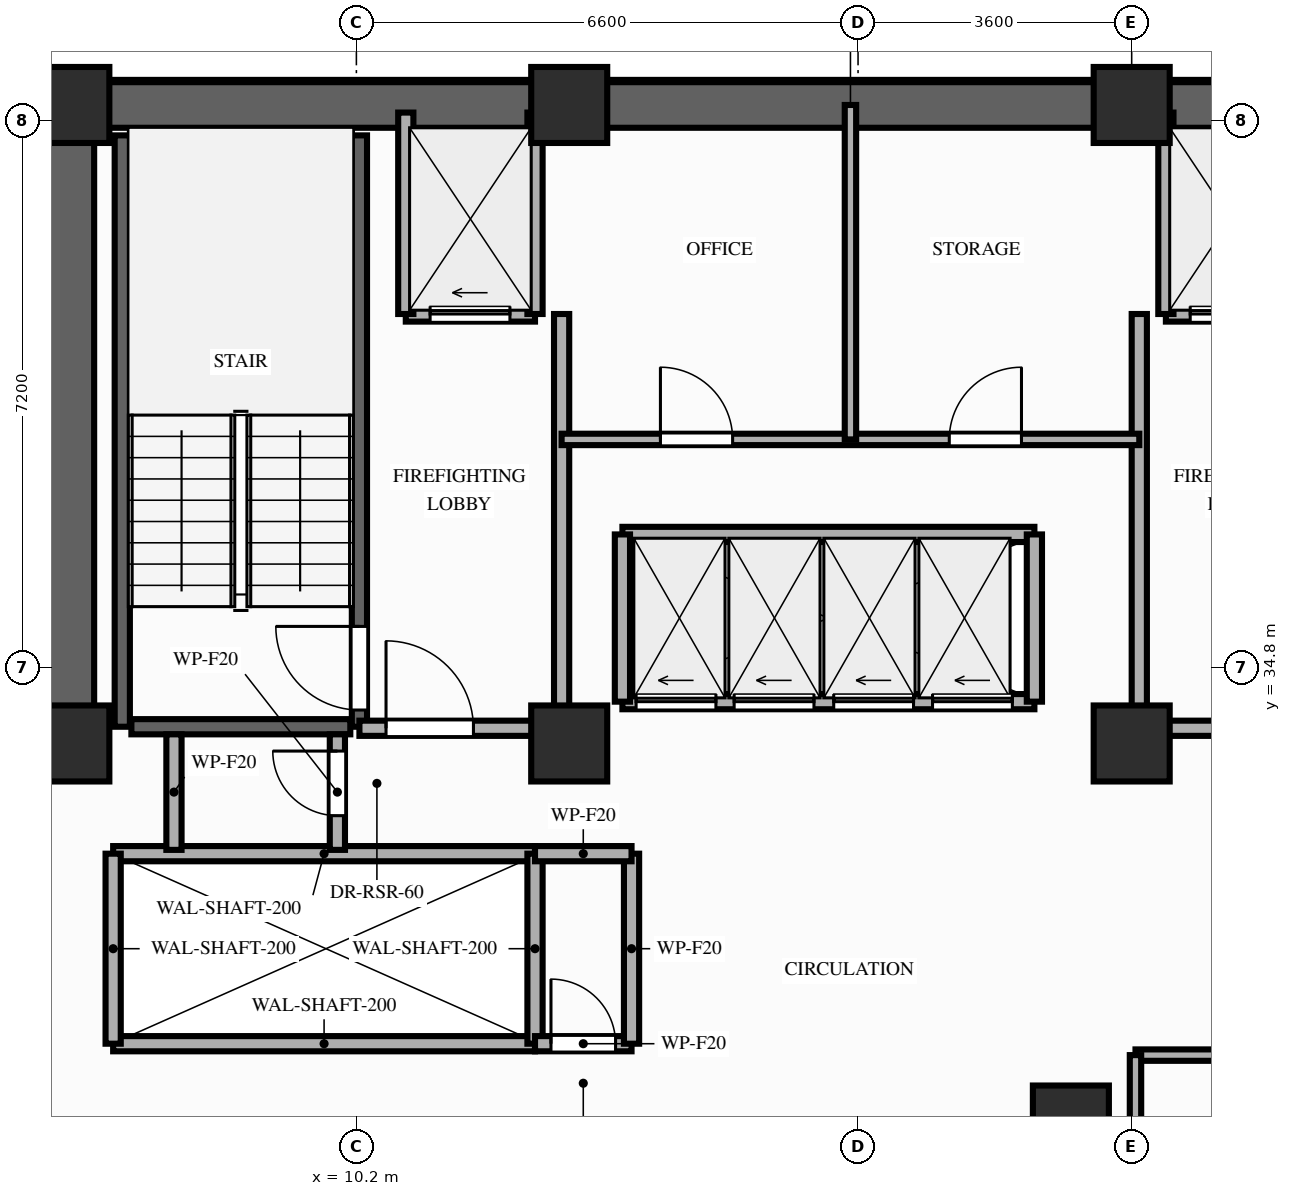
"""IFC4 building model, lengths in metres.
Left out: names, types, materials, properties, quantities, classifications, styles, units other than length and angle.
Written with IfcOpenShell. Run it as: python <this file> out.ifc"""

import sys

from ifc_helpers import new_model, si_unit, direction, frame, frame_2d, origin, origin_2d, place, context, subcontext, project, spatial, rectangle, extrude, element, fill, save


model = new_model("IFC4")
c1 = context("Model", 3, precision=1e-05, world=origin(), true_north=direction((0.0, 1.0)))
c2 = subcontext(c1, "Body", "Model", "MODEL_VIEW")
j1 = project(units=[si_unit("LENGTHUNIT", "METRE"), si_unit("PLANEANGLEUNIT", "RADIAN")], contexts=[c1])
p1 = place(None, origin())
s1 = spatial("IfcSite", under=j1, at=p1, CompositionType="ELEMENT")
p2 = place(p1, origin())
s2 = spatial("IfcBuilding", under=s1, at=p2, CompositionType="ELEMENT")
p3 = place(p2, frame((0.0, 0.0, 139.4)))
s3 = spatial("IfcBuildingStorey", under=s2, at=p3, CompositionType="ELEMENT", Elevation=139.4)
for number, where, z_axis, x_axis in (
    (1, (6.45, 33.8, 0.0), (0.0, 0.0, 1.0), (1.0, 0.0, 0.0)),
    (2, (13.0, 33.8, 0.0), (0.0, 0.0, 1.0), (1.0, 0.0, 0.0)),
    (3, (20.4, 33.8, 0.0), (0.0, 0.0, 1.0), (1.0, 0.0, 0.0)),
    (4, (6.45, 42.2, 0.0), (0.0, 0.0, 1.0), (1.0, 0.0, 0.0)),
    (5, (13.0, 42.2, 0.0), (0.0, 0.0, 1.0), (1.0, 0.0, 0.0)),
    (6, (20.4, 42.2, 0.0), (0.0, 0.0, 1.0), (1.0, 0.0, 0.0)),
    (7, (19.6, 28.8, 0.0), (0.0, 0.0, 1.0), (1.0, 0.0, 0.0)),
):
    element("IfcColumn", number, at=place(p3, frame(where, z_axis=z_axis, x_axis=x_axis)), inside=s3, PredefinedType="COLUMN", context=c2, shape_type="SweptSolid", body=[
        extrude(rectangle(XDim=1.0, YDim=1.0, at=origin_2d()), origin(), (0.0, 0.0, 1.0), 3.2),
    ])
p4 = place(p3, frame((6.45, 42.2, 0.0), z_axis=(0.0, 0.0, 1.0), x_axis=(1.0, 0.0, 0.0)))
e8 = element("IfcWall", 8, at=p4, inside=s3, PredefinedType="SHEAR", context=c2, shape_type="SweptSolid", body=[
    extrude(rectangle(XDim=20.45, YDim=0.6, at=frame_2d((10.225, 0.0))), origin(), (0.0, 0.0, 1.0), 3.02),
])
p5 = place(p3, frame((6.45, 33.8, 0.0), z_axis=(0.0, 0.0, 1.0), x_axis=(0.0, 1.0, 0.0)))
e9 = element("IfcWall", 9, at=p5, inside=s3, PredefinedType="SHEAR", context=c2, shape_type="SweptSolid", body=[
    extrude(rectangle(XDim=7.95, YDim=0.6, at=frame_2d((3.975, 0.0))), origin(), (0.0, 0.0, 1.0), 3.02),
])
p6 = place(p3, frame((7.12, 34.02, 0.0), z_axis=(0.0, 0.0, 1.0), x_axis=(0.0, 1.0, 0.0)))
e10 = element("IfcWall", 10, at=p6, inside=s3, PredefinedType="SHEAR", context=c2, shape_type="SweptSolid", body=[
    extrude(rectangle(XDim=7.78, YDim=0.2, at=frame_2d((3.89, 0.0))), origin(), (0.0, 0.0, 1.0), 3.02),
])
p7 = place(p3, frame((10.24, 34.02, 0.0), z_axis=(0.0, 0.0, 1.0), x_axis=(0.0, 1.0, 0.0)))
e11 = element("IfcWall", 11, at=p7, inside=s3, PredefinedType="SHEAR", context=c2, shape_type="SweptSolid", body=[
    extrude(rectangle(XDim=7.78, YDim=0.2, at=frame_2d((3.89, 0.0))), origin(), (0.0, 0.0, 1.0), 3.02),
])
p8 = place(p7, frame((0.22, 0.0, 0.0)))
e12 = element("IfcOpeningElement", 12, at=p8, cuts=e11, PredefinedType="OPENING", context=c2, shape_type="SweptSolid", body=[
    extrude(rectangle(XDim=1.1, YDim=2.15, at=frame_2d((0.55, 1.075))), frame((0.0, 0.11, 0.0), z_axis=(0.0, -1.0, 0.0), x_axis=(1.0, 0.0, 0.0)), (0.0, 0.0, 1.0), 0.22),
])
p9 = place(p3, frame((7.24, 34.02, 0.0), z_axis=(0.0, 0.0, 1.0), x_axis=(1.0, 0.0, 0.0)))
e13 = element("IfcWall", 13, at=p9, inside=s3, PredefinedType="SHEAR", context=c2, shape_type="SweptSolid", body=[
    extrude(rectangle(XDim=2.88, YDim=0.2, at=frame_2d((1.44, 0.0))), origin(), (0.0, 0.0, 1.0), 3.02),
])
for number, where, z_axis, x_axis in (
    (14, (7.0, 29.85, 0.0), (0.0, 0.0, 1.0), (1.0, 0.0, 0.0)),
    (15, (7.0, 32.35, 0.0), (0.0, 0.0, 1.0), (1.0, 0.0, 0.0)),
):
    element("IfcWall", number, at=place(p3, frame(where, z_axis=z_axis, x_axis=x_axis)), inside=s3, PredefinedType="MOVABLE", context=c2, shape_type="SweptSolid", body=[
        extrude(rectangle(XDim=5.55, YDim=0.2, at=frame_2d((2.775, 0.0))), origin(), (0.0, 0.0, 1.0), 3.02),
    ])
for number, where, z_axis, x_axis in (
    (16, (7.0, 29.85, 0.0), (0.0, 0.0, 1.0), (0.0, 1.0, 0.0)),
    (17, (12.55, 29.85, 0.0), (0.0, 0.0, 1.0), (0.0, 1.0, 0.0)),
):
    element("IfcWall", number, at=place(p3, frame(where, z_axis=z_axis, x_axis=x_axis)), inside=s3, PredefinedType="MOVABLE", context=c2, shape_type="SweptSolid", body=[
        extrude(rectangle(XDim=2.5, YDim=0.2, at=frame_2d((1.25, 0.0))), origin(), (0.0, 0.0, 1.0), 3.02),
    ])
p10 = place(p3, frame((10.85, 39.45, 0.0), z_axis=(0.0, 0.0, 1.0), x_axis=(1.0, 0.0, 0.0)))
e18 = element("IfcWall", 18, at=p10, inside=s3, PredefinedType="MOVABLE", context=c2, shape_type="SweptSolid", body=[
    extrude(rectangle(XDim=1.7, YDim=0.2, at=frame_2d((0.85, 0.0))), origin(), (0.0, 0.0, 1.0), 3.02),
])
p11 = place(p10, frame((0.32, 0.0, 0.0)))
e19 = element("IfcOpeningElement", 19, at=p11, cuts=e18, PredefinedType="OPENING", context=c2, shape_type="SweptSolid", body=[
    extrude(rectangle(XDim=1.05, YDim=2.15, at=frame_2d((0.525, 1.075))), frame((0.0, 0.11, 0.0), z_axis=(0.0, -1.0, 0.0), x_axis=(1.0, 0.0, 0.0)), (0.0, 0.0, 1.0), 0.22),
])
p12 = place(p3, frame((20.85, 39.45, 0.0), z_axis=(0.0, 0.0, 1.0), x_axis=(1.0, 0.0, 0.0)))
e20 = element("IfcWall", 20, at=p12, inside=s3, PredefinedType="MOVABLE", context=c2, shape_type="SweptSolid", body=[
    extrude(rectangle(XDim=1.7, YDim=0.2, at=frame_2d((0.85, 0.0))), origin(), (0.0, 0.0, 1.0), 3.02),
])
p13 = place(p12, frame((0.32, 0.0, 0.0)))
e21 = element("IfcOpeningElement", 21, at=p13, cuts=e20, PredefinedType="OPENING", context=c2, shape_type="SweptSolid", body=[
    extrude(rectangle(XDim=1.05, YDim=2.15, at=frame_2d((0.525, 1.075))), frame((0.0, 0.11, 0.0), z_axis=(0.0, -1.0, 0.0), x_axis=(1.0, 0.0, 0.0)), (0.0, 0.0, 1.0), 0.22),
])
for number, where, z_axis, x_axis in (
    (22, (10.85, 39.45, 0.0), (0.0, 0.0, 1.0), (0.0, 1.0, 0.0)),
    (23, (12.55, 39.45, 0.0), (0.0, 0.0, 1.0), (0.0, 1.0, 0.0)),
):
    element("IfcWall", number, at=place(p3, frame(where, z_axis=z_axis, x_axis=x_axis)), inside=s3, PredefinedType="MOVABLE", context=c2, shape_type="SweptSolid", body=[
        extrude(rectangle(XDim=2.65, YDim=0.2, at=frame_2d((1.325, 0.0))), origin(), (0.0, 0.0, 1.0), 2.45),
    ])
p14 = place(p3, frame((12.9, 34.0, 0.0), z_axis=(0.0, 0.0, 1.0), x_axis=(0.0, 1.0, 0.0)))
e24 = element("IfcWall", 24, at=p14, inside=s3, PredefinedType="PARTITIONING", context=c2, shape_type="SweptSolid", body=[
    extrude(rectangle(XDim=5.45, YDim=0.2, at=frame_2d((2.725, 0.0))), origin(), (0.0, 0.0, 1.0), 2.45),
])
p15 = place(p3, frame((10.24, 34.0, 0.0), z_axis=(0.0, 0.0, 1.0), x_axis=(1.0, 0.0, 0.0)))
e25 = element("IfcWall", 25, at=p15, inside=s3, PredefinedType="PARTITIONING", context=c2, shape_type="SweptSolid", body=[
    extrude(rectangle(XDim=2.66, YDim=0.2, at=frame_2d((1.33, 0.0))), origin(), (0.0, 0.0, 1.0), 2.45),
])
p16 = place(p15, frame((0.35, 0.0, 0.0)))
e26 = element("IfcOpeningElement", 26, at=p16, cuts=e25, PredefinedType="OPENING", context=c2, shape_type="SweptSolid", body=[
    extrude(rectangle(XDim=1.15, YDim=2.15, at=frame_2d((0.575, 1.075))), frame((0.0, 0.11, 0.0), z_axis=(0.0, -1.0, 0.0), x_axis=(1.0, 0.0, 0.0)), (0.0, 0.0, 1.0), 0.22),
])
p17 = place(p3, frame((20.85, 39.45, 0.0), z_axis=(0.0, 0.0, 1.0), x_axis=(0.0, 1.0, 0.0)))
e27 = element("IfcWall", 27, at=p17, inside=s3, PredefinedType="MOVABLE", context=c2, shape_type="SweptSolid", body=[
    extrude(rectangle(XDim=2.65, YDim=0.2, at=frame_2d((1.325, 0.0))), origin(), (0.0, 0.0, 1.0), 2.45),
])
p18 = place(p3, frame((20.5, 34.0, 0.0), z_axis=(0.0, 0.0, 1.0), x_axis=(0.0, 1.0, 0.0)))
e28 = element("IfcWall", 28, at=p18, inside=s3, PredefinedType="PARTITIONING", context=c2, shape_type="SweptSolid", body=[
    extrude(rectangle(XDim=5.45, YDim=0.2, at=frame_2d((2.725, 0.0))), origin(), (0.0, 0.0, 1.0), 2.45),
])
p19 = place(p3, frame((20.5, 34.0, 0.0), z_axis=(0.0, 0.0, 1.0), x_axis=(1.0, 0.0, 0.0)))
e29 = element("IfcWall", 29, at=p19, inside=s3, PredefinedType="PARTITIONING", context=c2, shape_type="SweptSolid", body=[
    extrude(rectangle(XDim=2.6, YDim=0.2, at=frame_2d((1.3, 0.0))), origin(), (0.0, 0.0, 1.0), 2.45),
])
p20 = place(p19, frame((1.05, 0.0, 0.0)))
e30 = element("IfcOpeningElement", 30, at=p20, cuts=e29, PredefinedType="OPENING", context=c2, shape_type="SweptSolid", body=[
    extrude(rectangle(XDim=1.15, YDim=2.15, at=frame_2d((0.575, 1.075))), frame((0.0, 0.11, 0.0), z_axis=(0.0, -1.0, 0.0), x_axis=(1.0, 0.0, 0.0)), (0.0, 0.0, 1.0), 0.22),
])
p21 = place(p3, frame((12.55, 29.85, 0.0), z_axis=(0.0, 0.0, 1.0), x_axis=(1.0, 0.0, 0.0)))
e31 = element("IfcWall", 31, at=p21, inside=s3, PredefinedType="PARTITIONING", context=c2, shape_type="SweptSolid", body=[
    extrude(rectangle(XDim=1.27, YDim=0.2, at=frame_2d((0.635, 0.0))), origin(), (0.0, 0.0, 1.0), 3.02),
])
p22 = place(p21, frame((0.21, 0.0, 0.0)))
e32 = element("IfcOpeningElement", 32, at=p22, cuts=e31, PredefinedType="OPENING", context=c2, shape_type="SweptSolid", body=[
    extrude(rectangle(XDim=0.85, YDim=2.05, at=frame_2d((0.425, 1.025))), frame((0.0, 0.11, 0.0), z_axis=(0.0, -1.0, 0.0), x_axis=(1.0, 0.0, 0.0)), (0.0, 0.0, 1.0), 0.22),
])
p23 = place(p3, frame((13.82, 29.85, 0.0), z_axis=(0.0, 0.0, 1.0), x_axis=(0.0, 1.0, 0.0)))
e33 = element("IfcWall", 33, at=p23, inside=s3, PredefinedType="PARTITIONING", context=c2, shape_type="SweptSolid", body=[
    extrude(rectangle(XDim=2.5, YDim=0.2, at=frame_2d((1.25, 0.0))), origin(), (0.0, 0.0, 1.0), 3.02),
])
p24 = place(p3, frame((12.55, 32.35, 0.0), z_axis=(0.0, 0.0, 1.0), x_axis=(1.0, 0.0, 0.0)))
e34 = element("IfcWall", 34, at=p24, inside=s3, PredefinedType="PARTITIONING", context=c2, shape_type="SweptSolid", body=[
    extrude(rectangle(XDim=1.27, YDim=0.2, at=frame_2d((0.635, 0.0))), origin(), (0.0, 0.0, 1.0), 3.02),
])
p25 = place(p3, frame((7.8, 32.4, 0.0), z_axis=(0.0, 0.0, 1.0), x_axis=(0.0, 1.0, 0.0)))
e35 = element("IfcWall", 35, at=p25, inside=s3, PredefinedType="PARTITIONING", context=c2, shape_type="SweptSolid", body=[
    extrude(rectangle(XDim=1.52, YDim=0.2, at=frame_2d((0.76, 0.0))), origin(), (0.0, 0.0, 1.0), 2.45),
])
p26 = place(p3, frame((9.95, 32.4, 0.0), z_axis=(0.0, 0.0, 1.0), x_axis=(0.0, 1.0, 0.0)))
e36 = element("IfcWall", 36, at=p26, inside=s3, PredefinedType="PARTITIONING", context=c2, shape_type="SweptSolid", body=[
    extrude(rectangle(XDim=1.52, YDim=0.2, at=frame_2d((0.76, 0.0))), origin(), (0.0, 0.0, 1.0), 2.45),
])
p27 = place(p26, frame((0.45, 0.0, 0.0)))
e37 = element("IfcOpeningElement", 37, at=p27, cuts=e36, PredefinedType="OPENING", context=c2, shape_type="SweptSolid", body=[
    extrude(rectangle(XDim=0.85, YDim=2.05, at=frame_2d((0.425, 1.025))), frame((0.0, 0.11, 0.0), z_axis=(0.0, -1.0, 0.0), x_axis=(1.0, 0.0, 0.0)), (0.0, 0.0, 1.0), 0.22),
])
p28 = place(p3, frame((12.9, 37.8, 0.0), z_axis=(0.0, 0.0, 1.0), x_axis=(1.0, 0.0, 0.0)))
e38 = element("IfcWall", 38, at=p28, inside=s3, PredefinedType="PARTITIONING", context=c2, shape_type="SweptSolid", body=[
    extrude(rectangle(XDim=7.6, YDim=0.15, at=frame_2d((3.8, 0.0))), origin(), (0.0, 0.0, 1.0), 3.02),
])
p29 = place(p28, frame((1.3, 0.0, 0.0)))
e39 = element("IfcOpeningElement", 39, at=p29, cuts=e38, PredefinedType="OPENING", context=c2, shape_type="SweptSolid", body=[
    extrude(rectangle(XDim=0.95, YDim=2.15, at=frame_2d((0.475, 1.075))), frame((0.0, 0.085, 0.0), z_axis=(0.0, -1.0, 0.0), x_axis=(1.0, 0.0, 0.0)), (0.0, 0.0, 1.0), 0.17),
])
p30 = place(p28, frame((5.1, 0.0, 0.0)))
e40 = element("IfcOpeningElement", 40, at=p30, cuts=e38, PredefinedType="OPENING", context=c2, shape_type="SweptSolid", body=[
    extrude(rectangle(XDim=0.95, YDim=2.15, at=frame_2d((0.475, 1.075))), frame((0.0, 0.085, 0.0), z_axis=(0.0, -1.0, 0.0), x_axis=(1.0, 0.0, 0.0)), (0.0, 0.0, 1.0), 0.17),
])
p31 = place(p3, frame((16.7, 37.8, 0.0), z_axis=(0.0, 0.0, 1.0), x_axis=(0.0, 1.0, 0.0)))
e41 = element("IfcWall", 41, at=p31, inside=s3, PredefinedType="PARTITIONING", context=c2, shape_type="SweptSolid", body=[
    extrude(rectangle(XDim=4.4, YDim=0.15, at=frame_2d((2.2, 0.0))), origin(), (0.0, 0.0, 1.0), 2.45),
])
p32 = place(p3, frame((13.7, 34.35, 0.0), z_axis=(0.0, 0.0, 1.0), x_axis=(1.0, 0.0, 0.0)))
e42 = element("IfcWall", 42, at=p32, inside=s3, PredefinedType="MOVABLE", context=c2, shape_type="SweptSolid", body=[
    extrude(rectangle(XDim=5.42, YDim=0.2, at=frame_2d((2.71, 0.0))), origin(), (0.0, 0.0, 1.0), 3.02),
])
p33 = place(p32, frame((0.18, 0.0, 0.0)))
e43 = element("IfcOpeningElement", 43, at=p33, cuts=e42, PredefinedType="OPENING", context=c2, shape_type="SweptSolid", body=[
    extrude(rectangle(XDim=1.05, YDim=2.15, at=frame_2d((0.525, 1.075))), frame((0.0, 0.11, 0.0), z_axis=(0.0, -1.0, 0.0), x_axis=(1.0, 0.0, 0.0)), (0.0, 0.0, 1.0), 0.22),
])
p34 = place(p32, frame((1.47, 0.0, 0.0)))
e44 = element("IfcOpeningElement", 44, at=p34, cuts=e42, PredefinedType="OPENING", context=c2, shape_type="SweptSolid", body=[
    extrude(rectangle(XDim=1.05, YDim=2.15, at=frame_2d((0.525, 1.075))), frame((0.0, 0.11, 0.0), z_axis=(0.0, -1.0, 0.0), x_axis=(1.0, 0.0, 0.0)), (0.0, 0.0, 1.0), 0.22),
])
p35 = place(p32, frame((2.78, 0.0, 0.0)))
e45 = element("IfcOpeningElement", 45, at=p35, cuts=e42, PredefinedType="OPENING", context=c2, shape_type="SweptSolid", body=[
    extrude(rectangle(XDim=1.05, YDim=2.15, at=frame_2d((0.525, 1.075))), frame((0.0, 0.11, 0.0), z_axis=(0.0, -1.0, 0.0), x_axis=(1.0, 0.0, 0.0)), (0.0, 0.0, 1.0), 0.22),
])
p36 = place(p32, frame((4.08, 0.0, 0.0)))
e46 = element("IfcOpeningElement", 46, at=p36, cuts=e42, PredefinedType="OPENING", context=c2, shape_type="SweptSolid", body=[
    extrude(rectangle(XDim=1.05, YDim=2.15, at=frame_2d((0.525, 1.075))), frame((0.0, 0.11, 0.0), z_axis=(0.0, -1.0, 0.0), x_axis=(1.0, 0.0, 0.0)), (0.0, 0.0, 1.0), 0.22),
])
p37 = place(p3, frame((13.7, 36.55, 0.0), z_axis=(0.0, 0.0, 1.0), x_axis=(1.0, 0.0, 0.0)))
e47 = element("IfcWall", 47, at=p37, inside=s3, PredefinedType="MOVABLE", context=c2, shape_type="SweptSolid", body=[
    extrude(rectangle(XDim=5.42, YDim=0.2, at=frame_2d((2.71, 0.0))), origin(), (0.0, 0.0, 1.0), 3.02),
])
for number, where, z_axis, x_axis in (
    (48, (13.7, 34.35, 0.0), (0.0, 0.0, 1.0), (0.0, 1.0, 0.0)),
    (49, (19.12, 34.35, 0.0), (0.0, 0.0, 1.0), (0.0, 1.0, 0.0)),
):
    element("IfcWall", number, at=place(p3, frame(where, z_axis=z_axis, x_axis=x_axis)), inside=s3, PredefinedType="MOVABLE", context=c2, shape_type="SweptSolid", body=[
        extrude(rectangle(XDim=2.2, YDim=0.2, at=frame_2d((1.1, 0.0))), origin(), (0.0, 0.0, 1.0), 3.02),
    ])
p38 = place(p3, frame((20.45, 29.7, 0.0), z_axis=(0.0, 0.0, 1.0), x_axis=(1.0, 0.0, 0.0)))
e50 = element("IfcWall", 50, at=p38, inside=s3, PredefinedType="PARTITIONING", context=c2, shape_type="SweptSolid", body=[
    extrude(rectangle(XDim=6.7, YDim=0.15, at=frame_2d((3.35, 0.0))), origin(), (0.0, 0.0, 1.0), 3.02),
])
p39 = place(p38, frame((2.8, 0.0, 0.0)))
e51 = element("IfcOpeningElement", 51, at=p39, cuts=e50, PredefinedType="OPENING", context=c2, shape_type="SweptSolid", body=[
    extrude(rectangle(XDim=0.95, YDim=2.15, at=frame_2d((0.475, 1.075))), frame((0.0, 0.085, 0.0), z_axis=(0.0, -1.0, 0.0), x_axis=(1.0, 0.0, 0.0)), (0.0, 0.0, 1.0), 0.17),
])
p40 = place(p3, frame((20.45, 26.75, 0.0), z_axis=(0.0, 0.0, 1.0), x_axis=(0.0, 1.0, 0.0)))
e52 = element("IfcWall", 52, at=p40, inside=s3, PredefinedType="PARTITIONING", context=c2, shape_type="SweptSolid", body=[
    extrude(rectangle(XDim=2.95, YDim=0.15, at=frame_2d((1.475, 0.0))), origin(), (0.0, 0.0, 1.0), 2.45),
])
p41 = place(p8, origin())
e53 = element("IfcDoor", 53, at=p41, inside=s3, OperationType="SINGLE_SWING_RIGHT", PredefinedType="DOOR", context=c2, shape_type="SweptSolid", body=[
    extrude(rectangle(XDim=1.1, YDim=2.15, at=frame_2d((0.55, 1.075))), frame((0.0, 0.025, 0.0), z_axis=(0.0, -1.0, 0.0), x_axis=(1.0, 0.0, 0.0)), (0.0, 0.0, 1.0), 0.05),
])
fill(e12, e53)
p42 = place(p11, origin())
e54 = element("IfcDoor", 54, at=p42, inside=s3, OperationType="SLIDING_TO_LEFT", PredefinedType="DOOR", context=c2, shape_type="SweptSolid", body=[
    extrude(rectangle(XDim=1.05, YDim=2.15, at=frame_2d((0.525, 1.075))), frame((0.0, 0.025, 0.0), z_axis=(0.0, -1.0, 0.0), x_axis=(1.0, 0.0, 0.0)), (0.0, 0.0, 1.0), 0.05),
])
fill(e19, e54)
p43 = place(p13, origin())
e55 = element("IfcDoor", 55, at=p43, inside=s3, OperationType="SLIDING_TO_LEFT", PredefinedType="DOOR", context=c2, shape_type="SweptSolid", body=[
    extrude(rectangle(XDim=1.05, YDim=2.15, at=frame_2d((0.525, 1.075))), frame((0.0, 0.025, 0.0), z_axis=(0.0, -1.0, 0.0), x_axis=(1.0, 0.0, 0.0)), (0.0, 0.0, 1.0), 0.05),
])
fill(e21, e55)
p44 = place(p16, origin())
e56 = element("IfcDoor", 56, at=p44, inside=s3, OperationType="SINGLE_SWING_LEFT", PredefinedType="DOOR", context=c2, shape_type="SweptSolid", body=[
    extrude(rectangle(XDim=1.15, YDim=2.15, at=frame_2d((0.575, 1.075))), frame((0.0, 0.025, 0.0), z_axis=(0.0, -1.0, 0.0), x_axis=(1.0, 0.0, 0.0)), (0.0, 0.0, 1.0), 0.05),
])
fill(e26, e56)
p45 = place(p22, origin())
e57 = element("IfcDoor", 57, at=p45, inside=s3, OperationType="SINGLE_SWING_LEFT", PredefinedType="DOOR", context=c2, shape_type="SweptSolid", body=[
    extrude(rectangle(XDim=0.85, YDim=2.05, at=frame_2d((0.425, 1.025))), frame((0.0, 0.025, 0.0), z_axis=(0.0, -1.0, 0.0), x_axis=(1.0, 0.0, 0.0)), (0.0, 0.0, 1.0), 0.05),
])
fill(e32, e57)
p46 = place(p27, origin())
e58 = element("IfcDoor", 58, at=p46, inside=s3, OperationType="SINGLE_SWING_RIGHT", PredefinedType="DOOR", context=c2, shape_type="SweptSolid", body=[
    extrude(rectangle(XDim=0.85, YDim=2.05, at=frame_2d((0.425, 1.025))), frame((0.0, 0.025, 0.0), z_axis=(0.0, -1.0, 0.0), x_axis=(1.0, 0.0, 0.0)), (0.0, 0.0, 1.0), 0.05),
])
fill(e37, e58)
p47 = place(p29, origin())
e59 = element("IfcDoor", 59, at=p47, inside=s3, OperationType="SINGLE_SWING_LEFT", PredefinedType="DOOR", context=c2, shape_type="SweptSolid", body=[
    extrude(rectangle(XDim=0.95, YDim=2.15, at=frame_2d((0.475, 1.075))), frame((0.0, 0.025, 0.0), z_axis=(0.0, -1.0, 0.0), x_axis=(1.0, 0.0, 0.0)), (0.0, 0.0, 1.0), 0.05),
])
fill(e39, e59)
p48 = place(p30, origin())
e60 = element("IfcDoor", 60, at=p48, inside=s3, OperationType="SINGLE_SWING_RIGHT", PredefinedType="DOOR", context=c2, shape_type="SweptSolid", body=[
    extrude(rectangle(XDim=0.95, YDim=2.15, at=frame_2d((0.475, 1.075))), frame((0.0, 0.025, 0.0), z_axis=(0.0, -1.0, 0.0), x_axis=(1.0, 0.0, 0.0)), (0.0, 0.0, 1.0), 0.05),
])
fill(e40, e60)
p49 = place(p33, origin())
e61 = element("IfcDoor", 61, at=p49, inside=s3, OperationType="SLIDING_TO_LEFT", PredefinedType="DOOR", context=c2, shape_type="SweptSolid", body=[
    extrude(rectangle(XDim=1.05, YDim=2.15, at=frame_2d((0.525, 1.075))), frame((0.0, 0.025, 0.0), z_axis=(0.0, -1.0, 0.0), x_axis=(1.0, 0.0, 0.0)), (0.0, 0.0, 1.0), 0.05),
])
fill(e43, e61)
p50 = place(p34, origin())
e62 = element("IfcDoor", 62, at=p50, inside=s3, OperationType="SLIDING_TO_LEFT", PredefinedType="DOOR", context=c2, shape_type="SweptSolid", body=[
    extrude(rectangle(XDim=1.05, YDim=2.15, at=frame_2d((0.525, 1.075))), frame((0.0, 0.025, 0.0), z_axis=(0.0, -1.0, 0.0), x_axis=(1.0, 0.0, 0.0)), (0.0, 0.0, 1.0), 0.05),
])
fill(e44, e62)
p51 = place(p35, origin())
e63 = element("IfcDoor", 63, at=p51, inside=s3, OperationType="SLIDING_TO_LEFT", PredefinedType="DOOR", context=c2, shape_type="SweptSolid", body=[
    extrude(rectangle(XDim=1.05, YDim=2.15, at=frame_2d((0.525, 1.075))), frame((0.0, 0.025, 0.0), z_axis=(0.0, -1.0, 0.0), x_axis=(1.0, 0.0, 0.0)), (0.0, 0.0, 1.0), 0.05),
])
fill(e45, e63)
p52 = place(p36, origin())
e64 = element("IfcDoor", 64, at=p52, inside=s3, OperationType="SLIDING_TO_LEFT", PredefinedType="DOOR", context=c2, shape_type="SweptSolid", body=[
    extrude(rectangle(XDim=1.05, YDim=2.15, at=frame_2d((0.525, 1.075))), frame((0.0, 0.025, 0.0), z_axis=(0.0, -1.0, 0.0), x_axis=(1.0, 0.0, 0.0)), (0.0, 0.0, 1.0), 0.05),
])
fill(e46, e64)
save(model, sys.argv[1])
